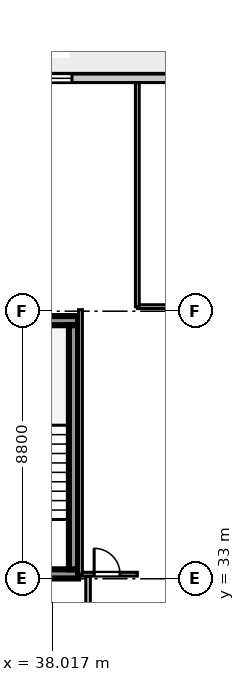
"""IFC4 building model, lengths in metres.
Left out: names, types, materials, properties, quantities, classifications, styles, units other than length and angle.
Written with IfcOpenShell. Run it as: python <this file> out.ifc"""

import sys

from ifc_helpers import new_model, si_unit, direction, frame, frame_2d, origin, place, context, subcontext, project, spatial, rectangle, extrude, element, fill, save


model = new_model("IFC4")
c1 = context("Model", 3, precision=1e-05, world=origin(), true_north=direction((0.0, 1.0)))
c2 = subcontext(c1, "Body", "Model", "MODEL_VIEW")
j1 = project(units=[si_unit("LENGTHUNIT", "METRE"), si_unit("PLANEANGLEUNIT", "RADIAN")], contexts=[c1])
p1 = place(None, origin())
s1 = spatial("IfcSite", under=j1, at=p1, CompositionType="ELEMENT")
p2 = place(p1, origin())
s2 = spatial("IfcBuilding", under=s1, at=p2, CompositionType="ELEMENT")
p3 = place(p2, frame((0.0, 0.0, 165.6)))
s3 = spatial("IfcBuildingStorey", under=s2, at=p3, CompositionType="ELEMENT", Elevation=165.6)
for number, where, z_axis, x_axis in (
    (1, (34.275, 33.16, 0.0), (0.0, 0.0, 1.0), (1.0, 0.0, 0.0)),
    (2, (34.275, 41.49, 0.0), (0.0, 0.0, 1.0), (1.0, 0.0, 0.0)),
):
    element("IfcWall", number, at=place(p3, frame(where, z_axis=z_axis, x_axis=x_axis)), inside=s3, PredefinedType="SHEAR", context=c2, shape_type="SweptSolid", body=[
        extrude(rectangle(XDim=4.595, YDim=0.3, at=frame_2d((2.298, 0.0))), origin(), (0.0, 0.0, 1.0), 3.6),
    ])
p4 = place(p3, frame((38.72, 33.31, 0.0), z_axis=(0.0, 0.0, 1.0), x_axis=(0.0, 1.0, 0.0)))
e3 = element("IfcWall", 3, at=p4, inside=s3, PredefinedType="SHEAR", context=c2, shape_type="SweptSolid", body=[
    extrude(rectangle(XDim=8.03, YDim=0.3, at=frame_2d((4.015, 0.0))), origin(), (0.0, 0.0, 1.0), 3.6),
])
p5 = place(p3, frame((45.55, 49.46, 0.0), z_axis=(0.0, 0.0, 1.0), x_axis=(-1.0, 0.0, 0.0)))
e4 = element("IfcWall", 4, at=p5, inside=s3, PredefinedType="STANDARD", context=c2, shape_type="SweptSolid", body=[
    extrude(rectangle(XDim=32.5, YDim=0.28, at=frame_2d((16.25, 0.0))), origin(), (0.0, 0.0, 1.0), 3.6),
])
p6 = place(p5, frame((30.55, 0.0, 0.0)))
e5 = element("IfcOpeningElement", 5, at=p6, cuts=e4, PredefinedType="OPENING", context=c2, shape_type="SweptSolid", body=[
    extrude(rectangle(XDim=1.0, YDim=2.05, at=frame_2d((0.5, 1.025))), frame((0.0, 0.15, 0.0), z_axis=(0.0, -1.0, 0.0), x_axis=(1.0, 0.0, 0.0)), (0.0, 0.0, 1.0), 0.3),
])
p7 = place(p5, frame((24.42, 0.0, 0.8)))
e6 = element("IfcOpeningElement", 6, at=p7, cuts=e4, PredefinedType="OPENING", context=c2, shape_type="SweptSolid", body=[
    extrude(rectangle(XDim=2.1, YDim=1.95, at=frame_2d((1.05, 0.975))), frame((0.0, 0.15, 0.0), z_axis=(0.0, -1.0, 0.0), x_axis=(1.0, 0.0, 0.0)), (0.0, 0.0, 1.0), 0.3),
])
p8 = place(p5, frame((18.355, 0.0, 0.8)))
e7 = element("IfcOpeningElement", 7, at=p8, cuts=e4, PredefinedType="OPENING", context=c2, shape_type="SweptSolid", body=[
    extrude(rectangle(XDim=1.35, YDim=1.9, at=frame_2d((0.675, 0.95))), frame((0.0, 0.15, 0.0), z_axis=(0.0, -1.0, 0.0), x_axis=(1.0, 0.0, 0.0)), (0.0, 0.0, 1.0), 0.3),
])
p9 = place(p5, frame((16.065, 0.0, 0.8)))
e8 = element("IfcOpeningElement", 8, at=p9, cuts=e4, PredefinedType="OPENING", context=c2, shape_type="SweptSolid", body=[
    extrude(rectangle(XDim=1.2, YDim=1.75, at=frame_2d((0.6, 0.875))), frame((0.0, 0.15, 0.0), z_axis=(0.0, -1.0, 0.0), x_axis=(1.0, 0.0, 0.0)), (0.0, 0.0, 1.0), 0.3),
])
p10 = place(p5, frame((13.68, 0.0, 0.8)))
e9 = element("IfcOpeningElement", 9, at=p10, cuts=e4, PredefinedType="OPENING", context=c2, shape_type="SweptSolid", body=[
    extrude(rectangle(XDim=1.2, YDim=1.75, at=frame_2d((0.6, 0.875))), frame((0.0, 0.15, 0.0), z_axis=(0.0, -1.0, 0.0), x_axis=(1.0, 0.0, 0.0)), (0.0, 0.0, 1.0), 0.3),
])
p11 = place(p5, frame((11.295, 0.0, 0.8)))
e10 = element("IfcOpeningElement", 10, at=p11, cuts=e4, PredefinedType="OPENING", context=c2, shape_type="SweptSolid", body=[
    extrude(rectangle(XDim=1.2, YDim=1.75, at=frame_2d((0.6, 0.875))), frame((0.0, 0.15, 0.0), z_axis=(0.0, -1.0, 0.0), x_axis=(1.0, 0.0, 0.0)), (0.0, 0.0, 1.0), 0.3),
])
p12 = place(p5, frame((6.88, 0.0, 0.8)))
e11 = element("IfcOpeningElement", 11, at=p12, cuts=e4, PredefinedType="OPENING", context=c2, shape_type="SweptSolid", body=[
    extrude(rectangle(XDim=1.8, YDim=2.0, at=frame_2d((0.9, 1.0))), frame((0.0, 0.15, 0.0), z_axis=(0.0, -1.0, 0.0), x_axis=(1.0, 0.0, 0.0)), (0.0, 0.0, 1.0), 0.3),
])
p13 = place(p5, frame((1.67, 0.0, 0.8)))
e12 = element("IfcOpeningElement", 12, at=p13, cuts=e4, PredefinedType="OPENING", context=c2, shape_type="SweptSolid", body=[
    extrude(rectangle(XDim=1.5, YDim=2.0, at=frame_2d((0.75, 1.0))), frame((0.0, 0.15, 0.0), z_axis=(0.0, -1.0, 0.0), x_axis=(1.0, 0.0, 0.0)), (0.0, 0.0, 1.0), 0.3),
])
p14 = place(p3, frame((39.2, 28.86, 0.0), z_axis=(0.0, 0.0, 1.0), x_axis=(0.0, 1.0, 0.0)))
e13 = element("IfcWall", 13, at=p14, inside=s3, PredefinedType="PARTITIONING", context=c2, shape_type="SweptSolid", body=[
    extrude(rectangle(XDim=4.22, YDim=0.15, at=frame_2d((2.11, 0.0))), origin(), (0.0, 0.0, 1.0), 3.6),
])
p15 = place(p3, frame((40.82, 41.95, 0.0), z_axis=(0.0, 0.0, 1.0), x_axis=(1.0, 0.0, 0.0)))
e14 = element("IfcWall", 14, at=p15, inside=s3, PredefinedType="PLUMBINGWALL", context=c2, shape_type="SweptSolid", body=[
    extrude(rectangle(XDim=9.7, YDim=0.125, at=frame_2d((4.85, 0.0))), origin(), (0.0, 0.0, 1.0), 2.95),
])
p16 = place(p3, frame((38.95, 33.15, 0.0), z_axis=(0.0, 0.0, 1.0), x_axis=(1.0, 0.0, 0.0)))
e15 = element("IfcWall", 15, at=p16, inside=s3, PredefinedType="PLUMBINGWALL", context=c2, shape_type="SweptSolid", body=[
    extrude(rectangle(XDim=1.87, YDim=0.125, at=frame_2d((0.935, 0.0))), origin(), (0.0, 0.0, 1.0), 3.6),
])
p17 = place(p16, frame((0.45, 0.0, 0.0)))
e16 = element("IfcOpeningElement", 16, at=p17, cuts=e15, PredefinedType="OPENING", context=c2, shape_type="SweptSolid", body=[
    extrude(rectangle(XDim=0.85, YDim=2.05, at=frame_2d((0.425, 1.025))), frame((0.0, 0.073, 0.0), z_axis=(0.0, -1.0, 0.0), x_axis=(1.0, 0.0, 0.0)), (0.0, 0.0, 1.0), 0.145),
])
p18 = place(p3, frame((38.95, 33.15, 0.0), z_axis=(0.0, 0.0, 1.0), x_axis=(0.0, 1.0, 0.0)))
e17 = element("IfcWall", 17, at=p18, inside=s3, PredefinedType="PLUMBINGWALL", context=c2, shape_type="SweptSolid", body=[
    extrude(rectangle(XDim=8.7, YDim=0.125, at=frame_2d((4.35, 0.0))), origin(), (0.0, 0.0, 1.0), 3.6),
])
p19 = place(p3, frame((40.82, 41.95, 0.0), z_axis=(0.0, 0.0, 1.0), x_axis=(0.0, 1.0, 0.0)))
e18 = element("IfcWall", 18, at=p19, inside=s3, PredefinedType="PLUMBINGWALL", context=c2, shape_type="SweptSolid", body=[
    extrude(rectangle(XDim=7.37, YDim=0.125, at=frame_2d((3.685, 0.0))), origin(), (0.0, 0.0, 1.0), 3.6),
])
p20 = place(p12, origin())
e19 = element("IfcWindow", 19, at=p20, inside=s3, PartitioningType="SINGLE_PANEL", PredefinedType="WINDOW", context=c2, shape_type="SweptSolid", body=[
    extrude(rectangle(XDim=1.8, YDim=2.0, at=frame_2d((0.9, 1.0))), frame((0.0, 0.03, 0.0), z_axis=(0.0, -1.0, 0.0), x_axis=(1.0, 0.0, 0.0)), (0.0, 0.0, 1.0), 0.06),
])
fill(e11, e19)
p21 = place(p17, origin())
e20 = element("IfcDoor", 20, at=p21, inside=s3, OperationType="SINGLE_SWING_LEFT", PredefinedType="DOOR", context=c2, shape_type="SweptSolid", body=[
    extrude(rectangle(XDim=0.85, YDim=2.05, at=frame_2d((0.425, 1.025))), frame((0.0, 0.025, 0.0), z_axis=(0.0, -1.0, 0.0), x_axis=(1.0, 0.0, 0.0)), (0.0, 0.0, 1.0), 0.05),
])
fill(e16, e20)
save(model, sys.argv[1])
